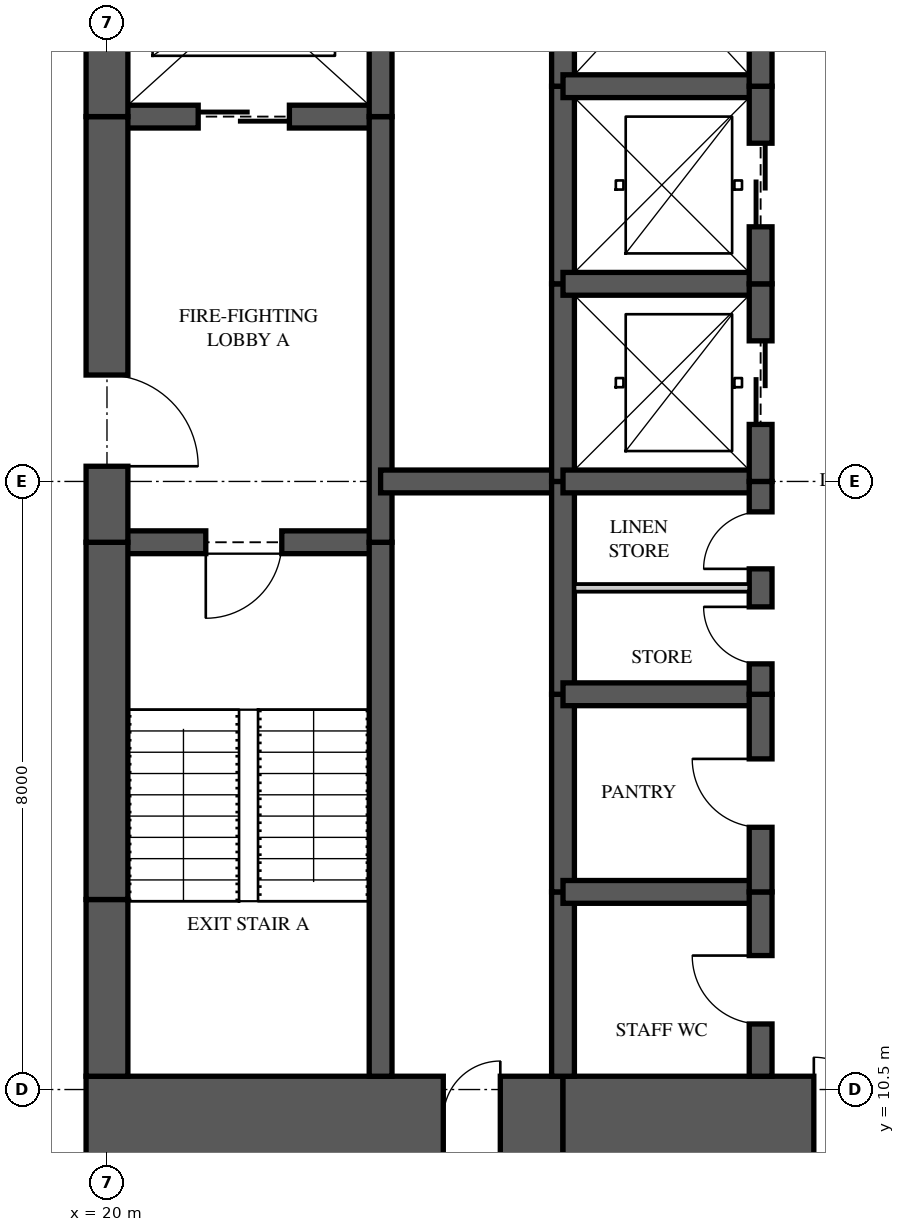
"""IFC4 building model, lengths in metres.
Left out: names, types, materials, properties, quantities, classifications, styles, units other than length and angle.
Written with IfcOpenShell. Run it as: python <this file> out.ifc"""

import sys

from ifc_helpers import new_model, si_unit, direction, frame, frame_2d, origin, place, context, subcontext, project, spatial, rectangle, extrude, element, fill, save


model = new_model("IFC4")
c1 = context("Model", 3, precision=1e-05, world=origin(), true_north=direction((0.0, 1.0)))
c2 = subcontext(c1, "Body", "Model", "MODEL_VIEW")
j1 = project(units=[si_unit("LENGTHUNIT", "METRE"), si_unit("PLANEANGLEUNIT", "RADIAN")], contexts=[c1])
p1 = place(None, origin())
s1 = spatial("IfcSite", under=j1, at=p1, CompositionType="ELEMENT")
p2 = place(p1, origin())
s2 = spatial("IfcBuilding", under=s1, at=p2, CompositionType="ELEMENT")
p3 = place(p2, frame((0.0, 0.0, 249.45)))
s3 = spatial("IfcBuildingStorey", under=s2, at=p3, CompositionType="ELEMENT", Elevation=249.45)
p4 = place(p3, frame((19.725, 10.125, 0.0), z_axis=(0.0, 0.0, 1.0), x_axis=(1.0, 0.0, 0.0)))
e1 = element("IfcWall", 1, at=p4, inside=s3, PredefinedType="SHEAR", context=c2, shape_type="SweptSolid", body=[
    extrude(rectangle(XDim=6.275, YDim=1.1, at=frame_2d((3.137, 0.0))), origin(), (0.0, 0.0, 1.0), 3.5),
])
p5 = place(p4, frame((4.7, 0.0, 0.0)))
e2 = element("IfcOpeningElement", 2, at=p5, cuts=e1, PredefinedType="OPENING", context=c2, shape_type="SweptSolid", body=[
    extrude(rectangle(XDim=0.75, YDim=2.1, at=frame_2d((0.375, 1.05))), frame((0.0, 0.56, 0.0), z_axis=(0.0, -1.0, 0.0), x_axis=(1.0, 0.0, 0.0)), (0.0, 0.0, 1.0), 1.12),
])
p6 = place(p3, frame((26.0, 10.125, 0.0), z_axis=(0.0, 0.0, 1.0), x_axis=(1.0, 0.0, 0.0)))
e3 = element("IfcWall", 3, at=p6, inside=s3, PredefinedType="SHEAR", context=c2, shape_type="SweptSolid", body=[
    extrude(rectangle(XDim=5.6, YDim=1.1, at=frame_2d((2.8, 0.0))), origin(), (0.0, 0.0, 1.0), 3.5),
])
p7 = place(p6, frame((3.3, 0.0, 0.0)))
e4 = element("IfcOpeningElement", 4, at=p7, cuts=e3, PredefinedType="OPENING", context=c2, shape_type="SweptSolid", body=[
    extrude(rectangle(XDim=1.6, YDim=2.1, at=frame_2d((0.8, 1.05))), frame((0.0, 0.56, 0.0), z_axis=(0.0, -1.0, 0.0), x_axis=(1.0, 0.0, 0.0)), (0.0, 0.0, 1.0), 1.12),
])
p8 = place(p3, frame((20.0, 26.325, 0.0), z_axis=(0.0, 0.0, 1.0), x_axis=(0.0, -1.0, 0.0)))
e5 = element("IfcWall", 5, at=p8, inside=s3, PredefinedType="SHEAR", context=c2, shape_type="SweptSolid", body=[
    extrude(rectangle(XDim=3.025, YDim=0.55, at=frame_2d((1.512, 0.0))), origin(), (0.0, 0.0, 1.0), 3.5),
])
p9 = place(p3, frame((20.0, 23.3, 0.0), z_axis=(0.0, 0.0, 1.0), x_axis=(0.0, -1.0, 0.0)))
e6 = element("IfcWall", 6, at=p9, inside=s3, PredefinedType="SHEAR", context=c2, shape_type="SweptSolid", body=[
    extrude(rectangle(XDim=5.6, YDim=0.55, at=frame_2d((2.8, 0.0))), origin(), (0.0, 0.0, 1.0), 3.5),
])
p10 = place(p9, frame((3.4, 0.0, 0.0)))
e7 = element("IfcOpeningElement", 7, at=p10, cuts=e6, PredefinedType="OPENING", context=c2, shape_type="SweptSolid", body=[
    extrude(rectangle(XDim=1.2, YDim=2.2, at=frame_2d((0.6, 1.1))), frame((0.0, 0.285, 0.0), z_axis=(0.0, -1.0, 0.0), x_axis=(1.0, 0.0, 0.0)), (0.0, 0.0, 1.0), 0.57),
])
p11 = place(p3, frame((20.0, 17.7, 0.0), z_axis=(0.0, 0.0, 1.0), x_axis=(0.0, -1.0, 0.0)))
e8 = element("IfcWall", 8, at=p11, inside=s3, PredefinedType="SHEAR", context=c2, shape_type="SweptSolid", body=[
    extrude(rectangle(XDim=4.7, YDim=0.55, at=frame_2d((2.35, 0.0))), origin(), (0.0, 0.0, 1.0), 3.5),
])
p12 = place(p3, frame((20.0, 13.0, 0.0), z_axis=(0.0, 0.0, 1.0), x_axis=(0.0, -1.0, 0.0)))
e9 = element("IfcWall", 9, at=p12, inside=s3, PredefinedType="SHEAR", context=c2, shape_type="SweptSolid", body=[
    extrude(rectangle(XDim=2.325, YDim=0.55, at=frame_2d((1.163, 0.0))), origin(), (0.0, 0.0, 1.0), 3.5),
])
p13 = place(p3, frame((23.6, 10.675, 0.0), z_axis=(0.0, 0.0, 1.0), x_axis=(0.0, 1.0, 0.0)))
e10 = element("IfcWall", 10, at=p13, inside=s3, PredefinedType="SHEAR", context=c2, shape_type="SweptSolid", body=[
    extrude(rectangle(XDim=7.025, YDim=0.3, at=frame_2d((3.512, 0.0))), origin(), (0.0, 0.0, 1.0), 3.5),
])
p14 = place(p3, frame((23.6, 17.7, 0.0), z_axis=(0.0, 0.0, 1.0), x_axis=(0.0, 1.0, 0.0)))
e11 = element("IfcWall", 11, at=p14, inside=s3, PredefinedType="SHEAR", context=c2, shape_type="SweptSolid", body=[
    extrude(rectangle(XDim=5.6, YDim=0.3, at=frame_2d((2.8, 0.0))), origin(), (0.0, 0.0, 1.0), 3.5),
])
p15 = place(p3, frame((23.6, 23.3, 0.0), z_axis=(0.0, 0.0, 1.0), x_axis=(0.0, 1.0, 0.0)))
e12 = element("IfcWall", 12, at=p15, inside=s3, PredefinedType="SHEAR", context=c2, shape_type="SweptSolid", body=[
    extrude(rectangle(XDim=3.025, YDim=0.3, at=frame_2d((1.512, 0.0))), origin(), (0.0, 0.0, 1.0), 3.5),
])
p16 = place(p3, frame((26.0, 10.675, 0.0), z_axis=(0.0, 0.0, 1.0), x_axis=(0.0, 1.0, 0.0)))
e13 = element("IfcWall", 13, at=p16, inside=s3, PredefinedType="SHEAR", context=c2, shape_type="SweptSolid", body=[
    extrude(rectangle(XDim=2.425, YDim=0.3, at=frame_2d((1.212, 0.0))), origin(), (0.0, 0.0, 1.0), 3.5),
])
p17 = place(p3, frame((26.0, 13.1, 0.0), z_axis=(0.0, 0.0, 1.0), x_axis=(0.0, 1.0, 0.0)))
e14 = element("IfcWall", 14, at=p17, inside=s3, PredefinedType="SHEAR", context=c2, shape_type="SweptSolid", body=[
    extrude(rectangle(XDim=2.6, YDim=0.3, at=frame_2d((1.3, 0.0))), origin(), (0.0, 0.0, 1.0), 3.5),
])
p18 = place(p3, frame((26.0, 15.7, 0.0), z_axis=(0.0, 0.0, 1.0), x_axis=(0.0, 1.0, 0.0)))
e15 = element("IfcWall", 15, at=p18, inside=s3, PredefinedType="SHEAR", context=c2, shape_type="SweptSolid", body=[
    extrude(rectangle(XDim=2.8, YDim=0.3, at=frame_2d((1.4, 0.0))), origin(), (0.0, 0.0, 1.0), 3.5),
])
p19 = place(p3, frame((26.0, 18.5, 0.0), z_axis=(0.0, 0.0, 1.0), x_axis=(0.0, 1.0, 0.0)))
e16 = element("IfcWall", 16, at=p19, inside=s3, PredefinedType="SHEAR", context=c2, shape_type="SweptSolid", body=[
    extrude(rectangle(XDim=2.6, YDim=0.3, at=frame_2d((1.3, 0.0))), origin(), (0.0, 0.0, 1.0), 3.5),
])
p20 = place(p3, frame((26.0, 21.1, 0.0), z_axis=(0.0, 0.0, 1.0), x_axis=(0.0, 1.0, 0.0)))
e17 = element("IfcWall", 17, at=p20, inside=s3, PredefinedType="SHEAR", context=c2, shape_type="SweptSolid", body=[
    extrude(rectangle(XDim=2.6, YDim=0.3, at=frame_2d((1.3, 0.0))), origin(), (0.0, 0.0, 1.0), 3.5),
])
p21 = place(p3, frame((26.0, 23.7, 0.0), z_axis=(0.0, 0.0, 1.0), x_axis=(0.0, 1.0, 0.0)))
e18 = element("IfcWall", 18, at=p21, inside=s3, PredefinedType="SHEAR", context=c2, shape_type="SweptSolid", body=[
    extrude(rectangle(XDim=2.625, YDim=0.3, at=frame_2d((1.312, 0.0))), origin(), (0.0, 0.0, 1.0), 3.5),
])
p22 = place(p3, frame((28.6, 10.675, 0.0), z_axis=(0.0, 0.0, 1.0), x_axis=(0.0, 1.0, 0.0)))
e19 = element("IfcWall", 19, at=p22, inside=s3, PredefinedType="SHEAR", context=c2, shape_type="SweptSolid", body=[
    extrude(rectangle(XDim=2.425, YDim=0.3, at=frame_2d((1.212, 0.0))), origin(), (0.0, 0.0, 1.0), 3.5),
])
p23 = place(p22, frame((0.688, 0.0, 0.0)))
e20 = element("IfcOpeningElement", 20, at=p23, cuts=e19, PredefinedType="OPENING", context=c2, shape_type="SweptSolid", body=[
    extrude(rectangle(XDim=0.9, YDim=2.1, at=frame_2d((0.45, 1.05))), frame((0.0, 0.16, 0.0), z_axis=(0.0, -1.0, 0.0), x_axis=(1.0, 0.0, 0.0)), (0.0, 0.0, 1.0), 0.32),
])
p24 = place(p3, frame((28.6, 13.1, 0.0), z_axis=(0.0, 0.0, 1.0), x_axis=(0.0, 1.0, 0.0)))
e21 = element("IfcWall", 21, at=p24, inside=s3, PredefinedType="SHEAR", context=c2, shape_type="SweptSolid", body=[
    extrude(rectangle(XDim=2.6, YDim=0.3, at=frame_2d((1.3, 0.0))), origin(), (0.0, 0.0, 1.0), 3.5),
])
p25 = place(p24, frame((0.85, 0.0, 0.0)))
e22 = element("IfcOpeningElement", 22, at=p25, cuts=e21, PredefinedType="OPENING", context=c2, shape_type="SweptSolid", body=[
    extrude(rectangle(XDim=0.9, YDim=2.1, at=frame_2d((0.45, 1.05))), frame((0.0, 0.16, 0.0), z_axis=(0.0, -1.0, 0.0), x_axis=(1.0, 0.0, 0.0)), (0.0, 0.0, 1.0), 0.32),
])
p26 = place(p3, frame((28.6, 15.7, 0.0), z_axis=(0.0, 0.0, 1.0), x_axis=(0.0, 1.0, 0.0)))
e23 = element("IfcWall", 23, at=p26, inside=s3, PredefinedType="SHEAR", context=c2, shape_type="SweptSolid", body=[
    extrude(rectangle(XDim=2.8, YDim=0.3, at=frame_2d((1.4, 0.0))), origin(), (0.0, 0.0, 1.0), 3.5),
])
p27 = place(p26, frame((0.4, 0.0, 0.0)))
e24 = element("IfcOpeningElement", 24, at=p27, cuts=e23, PredefinedType="OPENING", context=c2, shape_type="SweptSolid", body=[
    extrude(rectangle(XDim=0.75, YDim=2.1, at=frame_2d((0.375, 1.05))), frame((0.0, 0.16, 0.0), z_axis=(0.0, -1.0, 0.0), x_axis=(1.0, 0.0, 0.0)), (0.0, 0.0, 1.0), 0.32),
])
p28 = place(p26, frame((1.65, 0.0, 0.0)))
e25 = element("IfcOpeningElement", 25, at=p28, cuts=e23, PredefinedType="OPENING", context=c2, shape_type="SweptSolid", body=[
    extrude(rectangle(XDim=0.75, YDim=2.1, at=frame_2d((0.375, 1.05))), frame((0.0, 0.16, 0.0), z_axis=(0.0, -1.0, 0.0), x_axis=(1.0, 0.0, 0.0)), (0.0, 0.0, 1.0), 0.32),
])
p29 = place(p3, frame((28.6, 18.5, 0.0), z_axis=(0.0, 0.0, 1.0), x_axis=(0.0, 1.0, 0.0)))
e26 = element("IfcWall", 26, at=p29, inside=s3, PredefinedType="SHEAR", context=c2, shape_type="SweptSolid", body=[
    extrude(rectangle(XDim=2.6, YDim=0.3, at=frame_2d((1.3, 0.0))), origin(), (0.0, 0.0, 1.0), 3.5),
])
p30 = place(p29, frame((0.75, 0.0, 0.0)))
e27 = element("IfcOpeningElement", 27, at=p30, cuts=e26, PredefinedType="OPENING", context=c2, shape_type="SweptSolid", body=[
    extrude(rectangle(XDim=1.1, YDim=2.1, at=frame_2d((0.55, 1.05))), frame((0.0, 0.16, 0.0), z_axis=(0.0, -1.0, 0.0), x_axis=(1.0, 0.0, 0.0)), (0.0, 0.0, 1.0), 0.32),
])
p31 = place(p3, frame((28.6, 21.1, 0.0), z_axis=(0.0, 0.0, 1.0), x_axis=(0.0, 1.0, 0.0)))
e28 = element("IfcWall", 28, at=p31, inside=s3, PredefinedType="SHEAR", context=c2, shape_type="SweptSolid", body=[
    extrude(rectangle(XDim=2.6, YDim=0.3, at=frame_2d((1.3, 0.0))), origin(), (0.0, 0.0, 1.0), 3.5),
])
p32 = place(p31, frame((0.75, 0.0, 0.0)))
e29 = element("IfcOpeningElement", 29, at=p32, cuts=e28, PredefinedType="OPENING", context=c2, shape_type="SweptSolid", body=[
    extrude(rectangle(XDim=1.1, YDim=2.1, at=frame_2d((0.55, 1.05))), frame((0.0, 0.16, 0.0), z_axis=(0.0, -1.0, 0.0), x_axis=(1.0, 0.0, 0.0)), (0.0, 0.0, 1.0), 0.32),
])
p33 = place(p3, frame((28.6, 23.7, 0.0), z_axis=(0.0, 0.0, 1.0), x_axis=(0.0, 1.0, 0.0)))
e30 = element("IfcWall", 30, at=p33, inside=s3, PredefinedType="SHEAR", context=c2, shape_type="SweptSolid", body=[
    extrude(rectangle(XDim=2.625, YDim=0.3, at=frame_2d((1.312, 0.0))), origin(), (0.0, 0.0, 1.0), 3.5),
])
p34 = place(p33, frame((0.85, 0.0, 0.0)))
e31 = element("IfcOpeningElement", 31, at=p34, cuts=e30, PredefinedType="OPENING", context=c2, shape_type="SweptSolid", body=[
    extrude(rectangle(XDim=1.1, YDim=2.1, at=frame_2d((0.55, 1.05))), frame((0.0, 0.16, 0.0), z_axis=(0.0, -1.0, 0.0), x_axis=(1.0, 0.0, 0.0)), (0.0, 0.0, 1.0), 0.32),
])
p35 = place(p3, frame((20.0, 17.7, 0.0), z_axis=(0.0, 0.0, 1.0), x_axis=(1.0, 0.0, 0.0)))
e32 = element("IfcWall", 32, at=p35, inside=s3, PredefinedType="SHEAR", context=c2, shape_type="SweptSolid", body=[
    extrude(rectangle(XDim=3.6, YDim=0.3, at=frame_2d((1.8, 0.0))), origin(), (0.0, 0.0, 1.0), 3.5),
])
p36 = place(p35, frame((1.3, 0.0, 0.0)))
e33 = element("IfcOpeningElement", 33, at=p36, cuts=e32, PredefinedType="OPENING", context=c2, shape_type="SweptSolid", body=[
    extrude(rectangle(XDim=1.0, YDim=2.1, at=frame_2d((0.5, 1.05))), frame((0.0, 0.16, 0.0), z_axis=(0.0, -1.0, 0.0), x_axis=(1.0, 0.0, 0.0)), (0.0, 0.0, 1.0), 0.32),
])
p37 = place(p3, frame((20.0, 23.3, 0.0), z_axis=(0.0, 0.0, 1.0), x_axis=(1.0, 0.0, 0.0)))
e34 = element("IfcWall", 34, at=p37, inside=s3, PredefinedType="SHEAR", context=c2, shape_type="SweptSolid", body=[
    extrude(rectangle(XDim=3.6, YDim=0.3, at=frame_2d((1.8, 0.0))), origin(), (0.0, 0.0, 1.0), 3.5),
])
p38 = place(p37, frame((1.2, 0.0, 0.0)))
e35 = element("IfcOpeningElement", 35, at=p38, cuts=e34, PredefinedType="OPENING", context=c2, shape_type="SweptSolid", body=[
    extrude(rectangle(XDim=1.2, YDim=2.1, at=frame_2d((0.6, 1.05))), frame((0.0, 0.16, 0.0), z_axis=(0.0, -1.0, 0.0), x_axis=(1.0, 0.0, 0.0)), (0.0, 0.0, 1.0), 0.32),
])
p39 = place(p3, frame((23.6, 18.5, 0.0), z_axis=(0.0, 0.0, 1.0), x_axis=(1.0, 0.0, 0.0)))
e36 = element("IfcWall", 36, at=p39, inside=s3, PredefinedType="SHEAR", context=c2, shape_type="SweptSolid", body=[
    extrude(rectangle(XDim=2.4, YDim=0.3, at=frame_2d((1.2, 0.0))), origin(), (0.0, 0.0, 1.0), 3.5),
])
for number, where, z_axis, x_axis in (
    (37, (26.0, 13.1, 0.0), (0.0, 0.0, 1.0), (1.0, 0.0, 0.0)),
    (38, (26.0, 15.7, 0.0), (0.0, 0.0, 1.0), (1.0, 0.0, 0.0)),
    (39, (26.0, 18.5, 0.0), (0.0, 0.0, 1.0), (1.0, 0.0, 0.0)),
    (40, (26.0, 21.1, 0.0), (0.0, 0.0, 1.0), (1.0, 0.0, 0.0)),
    (41, (26.0, 23.7, 0.0), (0.0, 0.0, 1.0), (1.0, 0.0, 0.0)),
):
    element("IfcWall", number, at=place(p3, frame(where, z_axis=z_axis, x_axis=x_axis)), inside=s3, PredefinedType="SHEAR", context=c2, shape_type="SweptSolid", body=[
        extrude(rectangle(XDim=2.6, YDim=0.3, at=frame_2d((1.3, 0.0))), origin(), (0.0, 0.0, 1.0), 3.5),
    ])
p40 = place(p3, frame((26.15, 17.1, 0.0), z_axis=(0.0, 0.0, 1.0), x_axis=(1.0, 0.0, 0.0)))
e42 = element("IfcWall", 42, at=p40, inside=s3, PredefinedType="PARTITIONING", context=c2, shape_type="SweptSolid", body=[
    extrude(rectangle(XDim=2.3, YDim=0.1, at=frame_2d((1.15, 0.0))), origin(), (0.0, 0.0, 1.0), 3.26),
])
p41 = place(p36, frame((1.0, 0.0, 0.0), z_axis=(0.0, 0.0, 1.0), x_axis=(-1.0, 0.0, 0.0)))
e43 = element("IfcDoor", 43, at=p41, inside=s3, OperationType="SINGLE_SWING_RIGHT", PredefinedType="DOOR", context=c2, shape_type="SweptSolid", body=[
    extrude(rectangle(XDim=1.0, YDim=2.1, at=frame_2d((0.5, 1.05))), frame((0.0, 0.025, 0.0), z_axis=(0.0, -1.0, 0.0), x_axis=(1.0, 0.0, 0.0)), (0.0, 0.0, 1.0), 0.05),
])
fill(e33, e43)
p42 = place(p10, origin())
e44 = element("IfcDoor", 44, at=p42, inside=s3, OperationType="SINGLE_SWING_RIGHT", PredefinedType="DOOR", context=c2, shape_type="SweptSolid", body=[
    extrude(rectangle(XDim=1.2, YDim=2.2, at=frame_2d((0.6, 1.1))), frame((0.0, 0.025, 0.0), z_axis=(0.0, -1.0, 0.0), x_axis=(1.0, 0.0, 0.0)), (0.0, 0.0, 1.0), 0.05),
])
fill(e7, e44)
p43 = place(p38, origin())
e45 = element("IfcDoor", 45, at=p43, inside=s3, OperationType="SLIDING_TO_LEFT", PredefinedType="DOOR", context=c2, shape_type="SweptSolid", body=[
    extrude(rectangle(XDim=1.2, YDim=2.1, at=frame_2d((0.6, 1.05))), frame((0.0, 0.025, 0.0), z_axis=(0.0, -1.0, 0.0), x_axis=(1.0, 0.0, 0.0)), (0.0, 0.0, 1.0), 0.05),
])
fill(e35, e45)
p44 = place(p30, origin())
e46 = element("IfcDoor", 46, at=p44, inside=s3, OperationType="SLIDING_TO_LEFT", PredefinedType="DOOR", context=c2, shape_type="SweptSolid", body=[
    extrude(rectangle(XDim=1.1, YDim=2.1, at=frame_2d((0.55, 1.05))), frame((0.0, 0.025, 0.0), z_axis=(0.0, -1.0, 0.0), x_axis=(1.0, 0.0, 0.0)), (0.0, 0.0, 1.0), 0.05),
])
fill(e27, e46)
p45 = place(p32, origin())
e47 = element("IfcDoor", 47, at=p45, inside=s3, OperationType="SLIDING_TO_LEFT", PredefinedType="DOOR", context=c2, shape_type="SweptSolid", body=[
    extrude(rectangle(XDim=1.1, YDim=2.1, at=frame_2d((0.55, 1.05))), frame((0.0, 0.025, 0.0), z_axis=(0.0, -1.0, 0.0), x_axis=(1.0, 0.0, 0.0)), (0.0, 0.0, 1.0), 0.05),
])
fill(e29, e47)
p46 = place(p23, origin())
e48 = element("IfcDoor", 48, at=p46, inside=s3, OperationType="SINGLE_SWING_RIGHT", PredefinedType="DOOR", context=c2, shape_type="SweptSolid", body=[
    extrude(rectangle(XDim=0.9, YDim=2.1, at=frame_2d((0.45, 1.05))), frame((0.0, 0.025, 0.0), z_axis=(0.0, -1.0, 0.0), x_axis=(1.0, 0.0, 0.0)), (0.0, 0.0, 1.0), 0.05),
])
fill(e20, e48)
p47 = place(p25, origin())
e49 = element("IfcDoor", 49, at=p47, inside=s3, OperationType="SINGLE_SWING_RIGHT", PredefinedType="DOOR", context=c2, shape_type="SweptSolid", body=[
    extrude(rectangle(XDim=0.9, YDim=2.1, at=frame_2d((0.45, 1.05))), frame((0.0, 0.025, 0.0), z_axis=(0.0, -1.0, 0.0), x_axis=(1.0, 0.0, 0.0)), (0.0, 0.0, 1.0), 0.05),
])
fill(e22, e49)
p48 = place(p27, origin())
e50 = element("IfcDoor", 50, at=p48, inside=s3, OperationType="SINGLE_SWING_RIGHT", PredefinedType="DOOR", context=c2, shape_type="SweptSolid", body=[
    extrude(rectangle(XDim=0.75, YDim=2.1, at=frame_2d((0.375, 1.05))), frame((0.0, 0.025, 0.0), z_axis=(0.0, -1.0, 0.0), x_axis=(1.0, 0.0, 0.0)), (0.0, 0.0, 1.0), 0.05),
])
fill(e24, e50)
p49 = place(p28, origin())
e51 = element("IfcDoor", 51, at=p49, inside=s3, OperationType="SINGLE_SWING_LEFT", PredefinedType="DOOR", context=c2, shape_type="SweptSolid", body=[
    extrude(rectangle(XDim=0.75, YDim=2.1, at=frame_2d((0.375, 1.05))), frame((0.0, 0.025, 0.0), z_axis=(0.0, -1.0, 0.0), x_axis=(1.0, 0.0, 0.0)), (0.0, 0.0, 1.0), 0.05),
])
fill(e25, e51)
p50 = place(p7, origin())
e52 = element("IfcDoor", 52, at=p50, inside=s3, OperationType="DOUBLE_DOOR_SINGLE_SWING", PredefinedType="DOOR", context=c2, shape_type="SweptSolid", body=[
    extrude(rectangle(XDim=1.6, YDim=2.1, at=frame_2d((0.8, 1.05))), frame((0.0, 0.025, 0.0), z_axis=(0.0, -1.0, 0.0), x_axis=(1.0, 0.0, 0.0)), (0.0, 0.0, 1.0), 0.05),
])
fill(e4, e52)
p51 = place(p5, origin())
e53 = element("IfcDoor", 53, at=p51, inside=s3, OperationType="SINGLE_SWING_RIGHT", PredefinedType="DOOR", context=c2, shape_type="SweptSolid", body=[
    extrude(rectangle(XDim=0.75, YDim=2.1, at=frame_2d((0.375, 1.05))), frame((0.0, 0.025, 0.0), z_axis=(0.0, -1.0, 0.0), x_axis=(1.0, 0.0, 0.0)), (0.0, 0.0, 1.0), 0.05),
])
fill(e2, e53)
save(model, sys.argv[1])
